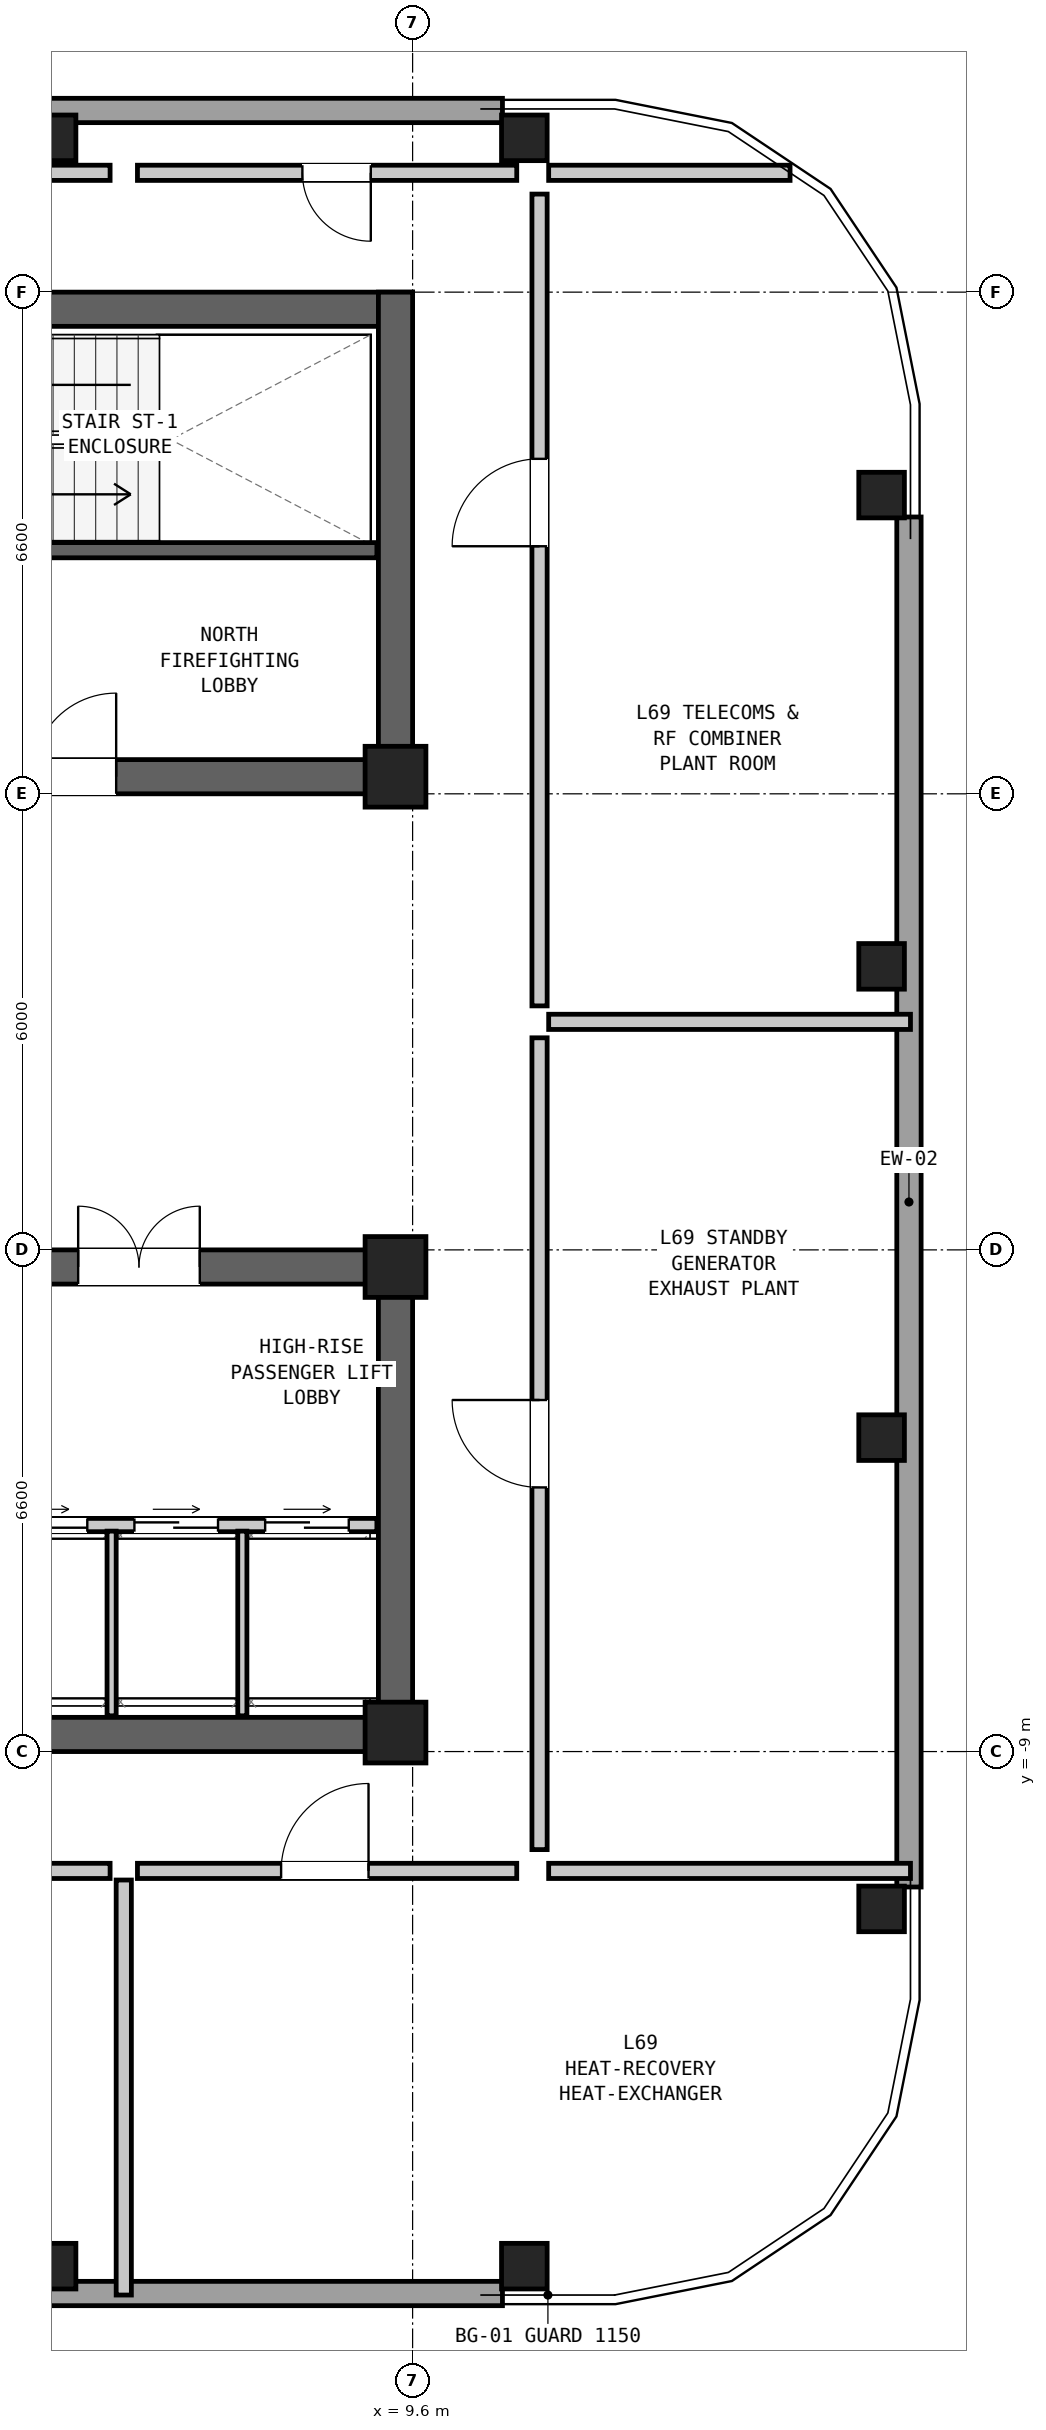
"""IFC4 building model, lengths in metres.
Left out: names, types, materials, properties, quantities, classifications, styles, units other than length and angle.
Written with IfcOpenShell. Run it as: python <this file> out.ifc"""

import sys

from ifc_helpers import new_model, si_unit, direction, frame, frame_2d, origin, origin_2d, place, context, subcontext, project, spatial, rectangle, hollow_rectangle, extrude, element, fill, save


model = new_model("IFC4")
c1 = context("Model", 3, precision=1e-05, world=origin(), true_north=direction((0.0, 1.0)))
c2 = subcontext(c1, "Body", "Model", "MODEL_VIEW")
j1 = project(units=[si_unit("LENGTHUNIT", "METRE"), si_unit("PLANEANGLEUNIT", "RADIAN")], contexts=[c1])
p1 = place(None, origin())
s1 = spatial("IfcSite", under=j1, at=p1, CompositionType="ELEMENT")
p2 = place(p1, origin())
s2 = spatial("IfcBuilding", under=s1, at=p2, CompositionType="ELEMENT")
p3 = place(p2, frame((0.0, 0.0, 234.9)))
s3 = spatial("IfcBuildingStorey", under=s2, at=p3, CompositionType="ELEMENT", Elevation=234.9)
p4 = place(p3, frame((-9.6, 9.975, 0.0), z_axis=(0.0, 0.0, 1.0), x_axis=(1.0, 0.0, 0.0)))
e1 = element("IfcWall", 1, at=p4, inside=s3, PredefinedType="SHEAR", context=c2, shape_type="SweptSolid", body=[
    extrude(rectangle(XDim=19.2, YDim=0.45, at=frame_2d((9.6, 0.0))), origin(), (0.0, 0.0, 1.0), 3.6),
])
p5 = place(p3, frame((-9.6, 3.825, 0.0), z_axis=(0.0, 0.0, 1.0), x_axis=(1.0, 0.0, 0.0)))
e2 = element("IfcWall", 2, at=p5, inside=s3, PredefinedType="SHEAR", context=c2, shape_type="SweptSolid", body=[
    extrude(rectangle(XDim=19.2, YDim=0.45, at=frame_2d((9.6, 0.0))), origin(), (0.0, 0.0, 1.0), 3.6),
])
p6 = place(p5, frame((14.2, 0.0, 0.0)))
e3 = element("IfcOpeningElement", 3, at=p6, cuts=e2, PredefinedType="OPENING", context=c2, shape_type="SweptSolid", body=[
    extrude(rectangle(XDim=1.1, YDim=2.08, at=frame_2d((0.55, 1.04))), frame((0.0, 0.237, 0.0), z_axis=(0.0, -1.0, 0.0), x_axis=(1.0, 0.0, 0.0)), (0.0, 0.0, 1.0), 0.474),
])
p7 = place(p5, frame((8.2, 0.0, 0.0)))
e4 = element("IfcOpeningElement", 4, at=p7, cuts=e2, PredefinedType="OPENING", context=c2, shape_type="SweptSolid", body=[
    extrude(rectangle(XDim=1.15, YDim=2.1, at=frame_2d((0.575, 1.05))), frame((0.0, 0.237, 0.0), z_axis=(0.0, -1.0, 0.0), x_axis=(1.0, 0.0, 0.0)), (0.0, 0.0, 1.0), 0.474),
])
p8 = place(p5, frame((2.5, 0.0, 0.0)))
e5 = element("IfcOpeningElement", 5, at=p8, cuts=e2, PredefinedType="OPENING", context=c2, shape_type="SweptSolid", body=[
    extrude(rectangle(XDim=1.6, YDim=2.12, at=frame_2d((0.8, 1.06))), frame((0.0, 0.237, 0.0), z_axis=(0.0, -1.0, 0.0), x_axis=(1.0, 0.0, 0.0)), (0.0, 0.0, 1.0), 0.474),
])
p9 = place(p3, frame((9.375, 3.6, 0.0), z_axis=(0.0, 0.0, 1.0), x_axis=(0.0, 1.0, 0.0)))
e6 = element("IfcWall", 6, at=p9, inside=s3, PredefinedType="SHEAR", context=c2, shape_type="SweptSolid", body=[
    extrude(rectangle(XDim=6.6, YDim=0.45, at=frame_2d((3.3, 0.0))), origin(), (0.0, 0.0, 1.0), 3.6),
])
p10 = place(p3, frame((-9.6, -8.775, 0.0), z_axis=(0.0, 0.0, 1.0), x_axis=(1.0, 0.0, 0.0)))
e7 = element("IfcWall", 7, at=p10, inside=s3, PredefinedType="SHEAR", context=c2, shape_type="SweptSolid", body=[
    extrude(rectangle(XDim=19.2, YDim=0.45, at=frame_2d((9.6, 0.0))), origin(), (0.0, 0.0, 1.0), 3.6),
])
p11 = place(p3, frame((-9.6, -2.625, 0.0), z_axis=(0.0, 0.0, 1.0), x_axis=(1.0, 0.0, 0.0)))
e8 = element("IfcWall", 8, at=p11, inside=s3, PredefinedType="SHEAR", context=c2, shape_type="SweptSolid", body=[
    extrude(rectangle(XDim=19.2, YDim=0.45, at=frame_2d((9.6, 0.0))), origin(), (0.0, 0.0, 1.0), 3.6),
])
p12 = place(p11, frame((3.8, 0.0, 0.0)))
e9 = element("IfcOpeningElement", 9, at=p12, cuts=e8, PredefinedType="OPENING", context=c2, shape_type="SweptSolid", body=[
    extrude(rectangle(XDim=1.1, YDim=2.08, at=frame_2d((0.55, 1.04))), frame((0.0, 0.237, 0.0), z_axis=(0.0, -1.0, 0.0), x_axis=(1.0, 0.0, 0.0)), (0.0, 0.0, 1.0), 0.474),
])
p13 = place(p11, frame((10.15, 0.0, 0.0)))
e10 = element("IfcOpeningElement", 10, at=p13, cuts=e8, PredefinedType="OPENING", context=c2, shape_type="SweptSolid", body=[
    extrude(rectangle(XDim=0.9, YDim=2.05, at=frame_2d((0.45, 1.025))), frame((0.0, 0.237, 0.0), z_axis=(0.0, -1.0, 0.0), x_axis=(1.0, 0.0, 0.0)), (0.0, 0.0, 1.0), 0.474),
])
p14 = place(p11, frame((12.1, 0.0, 0.0)))
e11 = element("IfcOpeningElement", 11, at=p14, cuts=e8, PredefinedType="OPENING", context=c2, shape_type="SweptSolid", body=[
    extrude(rectangle(XDim=0.95, YDim=2.1, at=frame_2d((0.475, 1.05))), frame((0.0, 0.237, 0.0), z_axis=(0.0, -1.0, 0.0), x_axis=(1.0, 0.0, 0.0)), (0.0, 0.0, 1.0), 0.474),
])
p15 = place(p11, frame((14.8, 0.0, 0.0)))
e12 = element("IfcOpeningElement", 12, at=p15, cuts=e8, PredefinedType="OPENING", context=c2, shape_type="SweptSolid", body=[
    extrude(rectangle(XDim=1.6, YDim=2.12, at=frame_2d((0.8, 1.06))), frame((0.0, 0.237, 0.0), z_axis=(0.0, -1.0, 0.0), x_axis=(1.0, 0.0, 0.0)), (0.0, 0.0, 1.0), 0.474),
])
p16 = place(p3, frame((9.375, -9.0, 0.0), z_axis=(0.0, 0.0, 1.0), x_axis=(0.0, 1.0, 0.0)))
e13 = element("IfcWall", 13, at=p16, inside=s3, PredefinedType="SHEAR", context=c2, shape_type="SweptSolid", body=[
    extrude(rectangle(XDim=6.6, YDim=0.45, at=frame_2d((3.3, 0.0))), origin(), (0.0, 0.0, 1.0), 3.6),
])
for number, where, z_axis, x_axis in (
    (14, (4.87, -15.77, 0.0), (0.0, 0.0, 1.0), (1.0, 0.0, 0.0)),
    (15, (11.07, -15.77, 0.0), (0.0, 0.0, 1.0), (1.0, 0.0, 0.0)),
    (16, (15.77, -11.07, 0.0), (0.0, 0.0, 1.0), (0.0, 1.0, 0.0)),
    (17, (15.77, -4.87, 0.0), (0.0, 0.0, 1.0), (0.0, 1.0, 0.0)),
    (18, (15.77, 1.33, 0.0), (0.0, 0.0, 1.0), (0.0, 1.0, 0.0)),
    (19, (15.77, 7.53, 0.0), (0.0, 0.0, 1.0), (0.0, 1.0, 0.0)),
    (20, (11.07, 12.23, 0.0), (0.0, 0.0, 1.0), (1.0, 0.0, 0.0)),
    (21, (4.87, 12.23, 0.0), (0.0, 0.0, 1.0), (1.0, 0.0, 0.0)),
):
    element("IfcColumn", number, at=place(p3, frame(where, z_axis=z_axis, x_axis=x_axis)), inside=s3, PredefinedType="COLUMN", context=c2, shape_type="SweptSolid", body=[
        extrude(hollow_rectangle(XDim=0.6, YDim=0.6, WallThickness=0.04, at=origin_2d()), origin(), (0.0, 0.0, 1.0), 3.6),
    ])
for number, where, z_axis, x_axis in (
    (22, (9.375, 3.825, 0.0), (0.0, 0.0, 1.0), (1.0, 0.0, 0.0)),
    (23, (9.375, -2.625, 0.0), (0.0, 0.0, 1.0), (1.0, 0.0, 0.0)),
    (24, (9.375, -8.75, 0.0), (0.0, 0.0, 1.0), (1.0, 0.0, 0.0)),
):
    element("IfcColumn", number, at=place(p3, frame(where, z_axis=z_axis, x_axis=x_axis)), inside=s3, PredefinedType="COLUMN", context=c2, shape_type="SweptSolid", body=[
        extrude(rectangle(XDim=0.8, YDim=0.8, at=origin_2d()), origin(), (0.0, 0.0, 1.0), 3.6),
    ])
for number, where, z_axis, x_axis in (
    (25, (10.782, -16.13, 0.0), (0.0, 0.0, 1.0), (-1.0, 0.0, 0.0)),
    (26, (16.13, 7.242, 0.0), (0.0, 0.0, 1.0), (0.0, -1.0, 0.0)),
    (27, (-7.242, 12.59, 0.0), (0.0, 0.0, 1.0), (1.0, 0.0, 0.0)),
):
    element("IfcWall", number, at=place(p3, frame(where, z_axis=z_axis, x_axis=x_axis)), inside=s3, PredefinedType="SOLIDWALL", context=c2, shape_type="SweptSolid", body=[
        extrude(rectangle(XDim=18.024, YDim=0.32, at=frame_2d((9.012, 0.0))), origin(), (0.0, 0.0, 1.0), 2.082),
    ])
p17 = place(p3, frame((2.36, 6.805, 0.0), z_axis=(0.0, 0.0, 1.0), x_axis=(1.0, 0.0, 0.0)))
e28 = element("IfcWall", 28, at=p17, inside=s3, PredefinedType="SHEAR", context=c2, shape_type="SweptSolid", body=[
    extrude(rectangle(XDim=6.77, YDim=0.2, at=frame_2d((3.385, 0.0))), origin(), (0.0, 0.0, 1.0), 3.22),
])
p18 = place(p17, frame((0.3, 0.0, 0.0)))
e29 = element("IfcOpeningElement", 29, at=p18, cuts=e28, PredefinedType="OPENING", context=c2, shape_type="SweptSolid", body=[
    extrude(rectangle(XDim=1.05, YDim=2.08, at=frame_2d((0.525, 1.04))), frame((0.0, 0.112, 0.0), z_axis=(0.0, -1.0, 0.0), x_axis=(1.0, 0.0, 0.0)), (0.0, 0.0, 1.0), 0.224),
])
p19 = place(p3, frame((4.0, -6.02, 0.0), z_axis=(0.0, 0.0, 1.0), x_axis=(1.0, 0.0, 0.0)))
e30 = element("IfcWall", 30, at=p19, inside=s3, PredefinedType="PARTITIONING", context=c2, shape_type="SweptSolid", body=[
    extrude(rectangle(XDim=5.13, YDim=0.175, at=frame_2d((2.565, 0.0))), origin(), (0.0, 0.0, 1.0), 3.22),
])
p20 = place(p19, frame((0.22, 0.0, 0.0)))
e31 = element("IfcOpeningElement", 31, at=p20, cuts=e30, PredefinedType="OPENING", context=c2, shape_type="SweptSolid", body=[
    extrude(rectangle(XDim=1.1, YDim=2.06, at=frame_2d((0.55, 1.03))), frame((0.0, 0.1, 0.0), z_axis=(0.0, -1.0, 0.0), x_axis=(1.0, 0.0, 0.0)), (0.0, 0.0, 1.0), 0.199),
])
p21 = place(p19, frame((1.94, 0.0, 0.0)))
e32 = element("IfcOpeningElement", 32, at=p21, cuts=e30, PredefinedType="OPENING", context=c2, shape_type="SweptSolid", body=[
    extrude(rectangle(XDim=1.1, YDim=2.06, at=frame_2d((0.55, 1.03))), frame((0.0, 0.1, 0.0), z_axis=(0.0, -1.0, 0.0), x_axis=(1.0, 0.0, 0.0)), (0.0, 0.0, 1.0), 0.199),
])
p22 = place(p19, frame((3.66, 0.0, 0.0)))
e33 = element("IfcOpeningElement", 33, at=p22, cuts=e30, PredefinedType="OPENING", context=c2, shape_type="SweptSolid", body=[
    extrude(rectangle(XDim=1.1, YDim=2.06, at=frame_2d((0.55, 1.03))), frame((0.0, 0.1, 0.0), z_axis=(0.0, -1.0, 0.0), x_axis=(1.0, 0.0, 0.0)), (0.0, 0.0, 1.0), 0.199),
])
for number, where, z_axis, x_axis in (
    (34, (5.64, -8.53, 0.0), (0.0, 0.0, 1.0), (0.0, 1.0, 0.0)),
    (35, (7.36, -8.53, 0.0), (0.0, 0.0, 1.0), (0.0, 1.0, 0.0)),
):
    element("IfcWall", number, at=place(p3, frame(where, z_axis=z_axis, x_axis=x_axis)), inside=s3, PredefinedType="PARTITIONING", context=c2, shape_type="SweptSolid", body=[
        extrude(rectangle(XDim=2.43, YDim=0.12, at=frame_2d((1.215, 0.0))), origin(), (0.0, 0.0, 1.0), 3.22),
    ])
p23 = place(p3, frame((5.62, 11.77, 0.0), z_axis=(0.0, 0.0, 1.0), x_axis=(-1.0, 0.0, 0.0)))
e36 = element("IfcWall", 36, at=p23, inside=s3, PredefinedType="PARTITIONING", context=c2, shape_type="SweptSolid", body=[
    extrude(rectangle(XDim=5.09, YDim=0.2, at=frame_2d((2.545, 0.0))), origin(), (0.0, 0.0, 1.0), 2.082),
])
p24 = place(p23, frame((1.97, 0.0, 0.0)))
e37 = element("IfcOpeningElement", 37, at=p24, cuts=e36, PredefinedType="OPENING", context=c2, shape_type="SweptSolid", body=[
    extrude(rectangle(XDim=0.9, YDim=2.05, at=frame_2d((0.45, 1.025))), frame((0.0, 0.112, 0.0), z_axis=(0.0, -1.0, 0.0), x_axis=(1.0, 0.0, 0.0)), (0.0, 0.0, 1.0), 0.224),
])
p25 = place(p3, frame((10.97, 11.77, 0.0), z_axis=(0.0, 0.0, 1.0), x_axis=(-1.0, 0.0, 0.0)))
e38 = element("IfcWall", 38, at=p25, inside=s3, PredefinedType="PARTITIONING", context=c2, shape_type="SweptSolid", body=[
    extrude(rectangle(XDim=4.99, YDim=0.2, at=frame_2d((2.495, 0.0))), origin(), (0.0, 0.0, 1.0), 2.082),
])
p26 = place(p25, frame((1.92, 0.0, 0.0)))
e39 = element("IfcOpeningElement", 39, at=p26, cuts=e38, PredefinedType="OPENING", context=c2, shape_type="SweptSolid", body=[
    extrude(rectangle(XDim=0.9, YDim=2.05, at=frame_2d((0.45, 1.025))), frame((0.0, 0.112, 0.0), z_axis=(0.0, -1.0, 0.0), x_axis=(1.0, 0.0, 0.0)), (0.0, 0.0, 1.0), 0.224),
])
p27 = place(p3, frame((0.53, -10.57, 0.0), z_axis=(0.0, 0.0, 1.0), x_axis=(1.0, 0.0, 0.0)))
e40 = element("IfcWall", 40, at=p27, inside=s3, PredefinedType="PARTITIONING", context=c2, shape_type="SweptSolid", body=[
    extrude(rectangle(XDim=5.09, YDim=0.2, at=frame_2d((2.545, 0.0))), origin(), (0.0, 0.0, 1.0), 3.22),
])
p28 = place(p27, frame((1.97, 0.0, 0.0)))
e41 = element("IfcOpeningElement", 41, at=p28, cuts=e40, PredefinedType="OPENING", context=c2, shape_type="SweptSolid", body=[
    extrude(rectangle(XDim=1.15, YDim=2.1, at=frame_2d((0.575, 1.05))), frame((0.0, 0.112, 0.0), z_axis=(0.0, -1.0, 0.0), x_axis=(1.0, 0.0, 0.0)), (0.0, 0.0, 1.0), 0.224),
])
p29 = place(p3, frame((5.8, -16.15, 0.0), z_axis=(0.0, 0.0, 1.0), x_axis=(0.0, 1.0, 0.0)))
e42 = element("IfcWall", 42, at=p29, inside=s3, PredefinedType="PARTITIONING", context=c2, shape_type="SweptSolid", body=[
    extrude(rectangle(XDim=5.46, YDim=0.2, at=frame_2d((2.73, 0.0))), origin(), (0.0, 0.0, 1.0), 2.438),
])
p30 = place(p3, frame((5.98, -10.57, 0.0), z_axis=(0.0, 0.0, 1.0), x_axis=(1.0, 0.0, 0.0)))
e43 = element("IfcWall", 43, at=p30, inside=s3, PredefinedType="PARTITIONING", context=c2, shape_type="SweptSolid", body=[
    extrude(rectangle(XDim=4.99, YDim=0.2, at=frame_2d((2.495, 0.0))), origin(), (0.0, 0.0, 1.0), 3.22),
])
p31 = place(p30, frame((1.89, 0.0, 0.0)))
e44 = element("IfcOpeningElement", 44, at=p31, cuts=e43, PredefinedType="OPENING", context=c2, shape_type="SweptSolid", body=[
    extrude(rectangle(XDim=1.15, YDim=2.1, at=frame_2d((0.575, 1.05))), frame((0.0, 0.112, 0.0), z_axis=(0.0, -1.0, 0.0), x_axis=(1.0, 0.0, 0.0)), (0.0, 0.0, 1.0), 0.224),
])
p32 = place(p3, frame((11.39, 11.77, 0.0), z_axis=(0.0, 0.0, 1.0), x_axis=(1.0, 0.0, 0.0)))
e45 = element("IfcWall", 45, at=p32, inside=s3, PredefinedType="PARTITIONING", context=c2, shape_type="SweptSolid", body=[
    extrude(rectangle(XDim=3.176, YDim=0.2, at=frame_2d((1.588, 0.0))), origin(), (0.0, 0.0, 1.0), 3.22),
])
p33 = place(p3, frame((11.39, -10.57, 0.0), z_axis=(0.0, 0.0, 1.0), x_axis=(1.0, 0.0, 0.0)))
e46 = element("IfcWall", 46, at=p33, inside=s3, PredefinedType="PARTITIONING", context=c2, shape_type="SweptSolid", body=[
    extrude(rectangle(XDim=4.76, YDim=0.2, at=frame_2d((2.38, 0.0))), origin(), (0.0, 0.0, 1.0), 3.22),
])
p34 = place(p3, frame((11.39, 0.6, 0.0), z_axis=(0.0, 0.0, 1.0), x_axis=(1.0, 0.0, 0.0)))
e47 = element("IfcWall", 47, at=p34, inside=s3, PredefinedType="PARTITIONING", context=c2, shape_type="SweptSolid", body=[
    extrude(rectangle(XDim=4.76, YDim=0.2, at=frame_2d((2.38, 0.0))), origin(), (0.0, 0.0, 1.0), 2.438),
])
p35 = place(p3, frame((11.27, -10.29, 0.0), z_axis=(0.0, 0.0, 1.0), x_axis=(0.0, 1.0, 0.0)))
e48 = element("IfcWall", 48, at=p35, inside=s3, PredefinedType="PARTITIONING", context=c2, shape_type="SweptSolid", body=[
    extrude(rectangle(XDim=10.68, YDim=0.2, at=frame_2d((5.34, 0.0))), origin(), (0.0, 0.0, 1.0), 3.22),
])
p36 = place(p35, frame((4.765, 0.0, 0.0)))
e49 = element("IfcOpeningElement", 49, at=p36, cuts=e48, PredefinedType="OPENING", context=c2, shape_type="SweptSolid", body=[
    extrude(rectangle(XDim=1.15, YDim=2.1, at=frame_2d((0.575, 1.05))), frame((0.0, 0.112, 0.0), z_axis=(0.0, -1.0, 0.0), x_axis=(1.0, 0.0, 0.0)), (0.0, 0.0, 1.0), 0.224),
])
p37 = place(p3, frame((11.27, 0.81, 0.0), z_axis=(0.0, 0.0, 1.0), x_axis=(0.0, 1.0, 0.0)))
e50 = element("IfcWall", 50, at=p37, inside=s3, PredefinedType="PARTITIONING", context=c2, shape_type="SweptSolid", body=[
    extrude(rectangle(XDim=10.68, YDim=0.2, at=frame_2d((5.34, 0.0))), origin(), (0.0, 0.0, 1.0), 3.22),
])
p38 = place(p37, frame((6.047, 0.0, 0.0)))
e51 = element("IfcOpeningElement", 51, at=p38, cuts=e50, PredefinedType="OPENING", context=c2, shape_type="SweptSolid", body=[
    extrude(rectangle(XDim=1.15, YDim=2.1, at=frame_2d((0.575, 1.05))), frame((0.0, 0.112, 0.0), z_axis=(0.0, -1.0, 0.0), x_axis=(1.0, 0.0, 0.0)), (0.0, 0.0, 1.0), 0.224),
])
p39 = place(p6, origin())
e52 = element("IfcDoor", 52, at=p39, inside=s3, OperationType="SINGLE_SWING_RIGHT", PredefinedType="DOOR", context=c2, shape_type="SweptSolid", body=[
    extrude(rectangle(XDim=1.1, YDim=2.08, at=frame_2d((0.55, 1.04))), frame((0.0, 0.025, 0.0), z_axis=(0.0, -1.0, 0.0), x_axis=(1.0, 0.0, 0.0)), (0.0, 0.0, 1.0), 0.05),
])
fill(e3, e52)
p40 = place(p20, origin())
e53 = element("IfcDoor", 53, at=p40, inside=s3, OperationType="DOUBLE_DOOR_SLIDING", PredefinedType="DOOR", context=c2, shape_type="SweptSolid", body=[
    extrude(rectangle(XDim=1.1, YDim=2.06, at=frame_2d((0.55, 1.03))), frame((0.0, 0.025, 0.0), z_axis=(0.0, -1.0, 0.0), x_axis=(1.0, 0.0, 0.0)), (0.0, 0.0, 1.0), 0.05),
])
fill(e31, e53)
p41 = place(p21, origin())
e54 = element("IfcDoor", 54, at=p41, inside=s3, OperationType="DOUBLE_DOOR_SLIDING", PredefinedType="DOOR", context=c2, shape_type="SweptSolid", body=[
    extrude(rectangle(XDim=1.1, YDim=2.06, at=frame_2d((0.55, 1.03))), frame((0.0, 0.025, 0.0), z_axis=(0.0, -1.0, 0.0), x_axis=(1.0, 0.0, 0.0)), (0.0, 0.0, 1.0), 0.05),
])
fill(e32, e54)
p42 = place(p22, origin())
e55 = element("IfcDoor", 55, at=p42, inside=s3, OperationType="DOUBLE_DOOR_SLIDING", PredefinedType="DOOR", context=c2, shape_type="SweptSolid", body=[
    extrude(rectangle(XDim=1.1, YDim=2.06, at=frame_2d((0.55, 1.03))), frame((0.0, 0.025, 0.0), z_axis=(0.0, -1.0, 0.0), x_axis=(1.0, 0.0, 0.0)), (0.0, 0.0, 1.0), 0.05),
])
fill(e33, e55)
p43 = place(p15, origin())
e56 = element("IfcDoor", 56, at=p43, inside=s3, OperationType="DOUBLE_DOOR_SINGLE_SWING", PredefinedType="DOOR", context=c2, shape_type="SweptSolid", body=[
    extrude(rectangle(XDim=1.6, YDim=2.12, at=frame_2d((0.8, 1.06))), frame((0.0, 0.025, 0.0), z_axis=(0.0, -1.0, 0.0), x_axis=(1.0, 0.0, 0.0)), (0.0, 0.0, 1.0), 0.05),
])
fill(e12, e56)
p44 = place(p26, origin())
e57 = element("IfcDoor", 57, at=p44, inside=s3, OperationType="SINGLE_SWING_LEFT", PredefinedType="DOOR", context=c2, shape_type="SweptSolid", body=[
    extrude(rectangle(XDim=0.9, YDim=2.05, at=frame_2d((0.45, 1.025))), frame((0.0, 0.025, 0.0), z_axis=(0.0, -1.0, 0.0), x_axis=(1.0, 0.0, 0.0)), (0.0, 0.0, 1.0), 0.05),
])
fill(e39, e57)
p45 = place(p31, origin())
e58 = element("IfcDoor", 58, at=p45, inside=s3, OperationType="SINGLE_SWING_RIGHT", PredefinedType="DOOR", context=c2, shape_type="SweptSolid", body=[
    extrude(rectangle(XDim=1.15, YDim=2.1, at=frame_2d((0.575, 1.05))), frame((0.0, 0.025, 0.0), z_axis=(0.0, -1.0, 0.0), x_axis=(1.0, 0.0, 0.0)), (0.0, 0.0, 1.0), 0.05),
])
fill(e44, e58)
p46 = place(p36, origin())
e59 = element("IfcDoor", 59, at=p46, inside=s3, OperationType="SINGLE_SWING_RIGHT", PredefinedType="DOOR", context=c2, shape_type="SweptSolid", body=[
    extrude(rectangle(XDim=1.15, YDim=2.1, at=frame_2d((0.575, 1.05))), frame((0.0, 0.025, 0.0), z_axis=(0.0, -1.0, 0.0), x_axis=(1.0, 0.0, 0.0)), (0.0, 0.0, 1.0), 0.05),
])
fill(e49, e59)
p47 = place(p38, origin())
e60 = element("IfcDoor", 60, at=p47, inside=s3, OperationType="SINGLE_SWING_LEFT", PredefinedType="DOOR", context=c2, shape_type="SweptSolid", body=[
    extrude(rectangle(XDim=1.15, YDim=2.1, at=frame_2d((0.575, 1.05))), frame((0.0, 0.025, 0.0), z_axis=(0.0, -1.0, 0.0), x_axis=(1.0, 0.0, 0.0)), (0.0, 0.0, 1.0), 0.05),
])
fill(e51, e60)
save(model, sys.argv[1])
